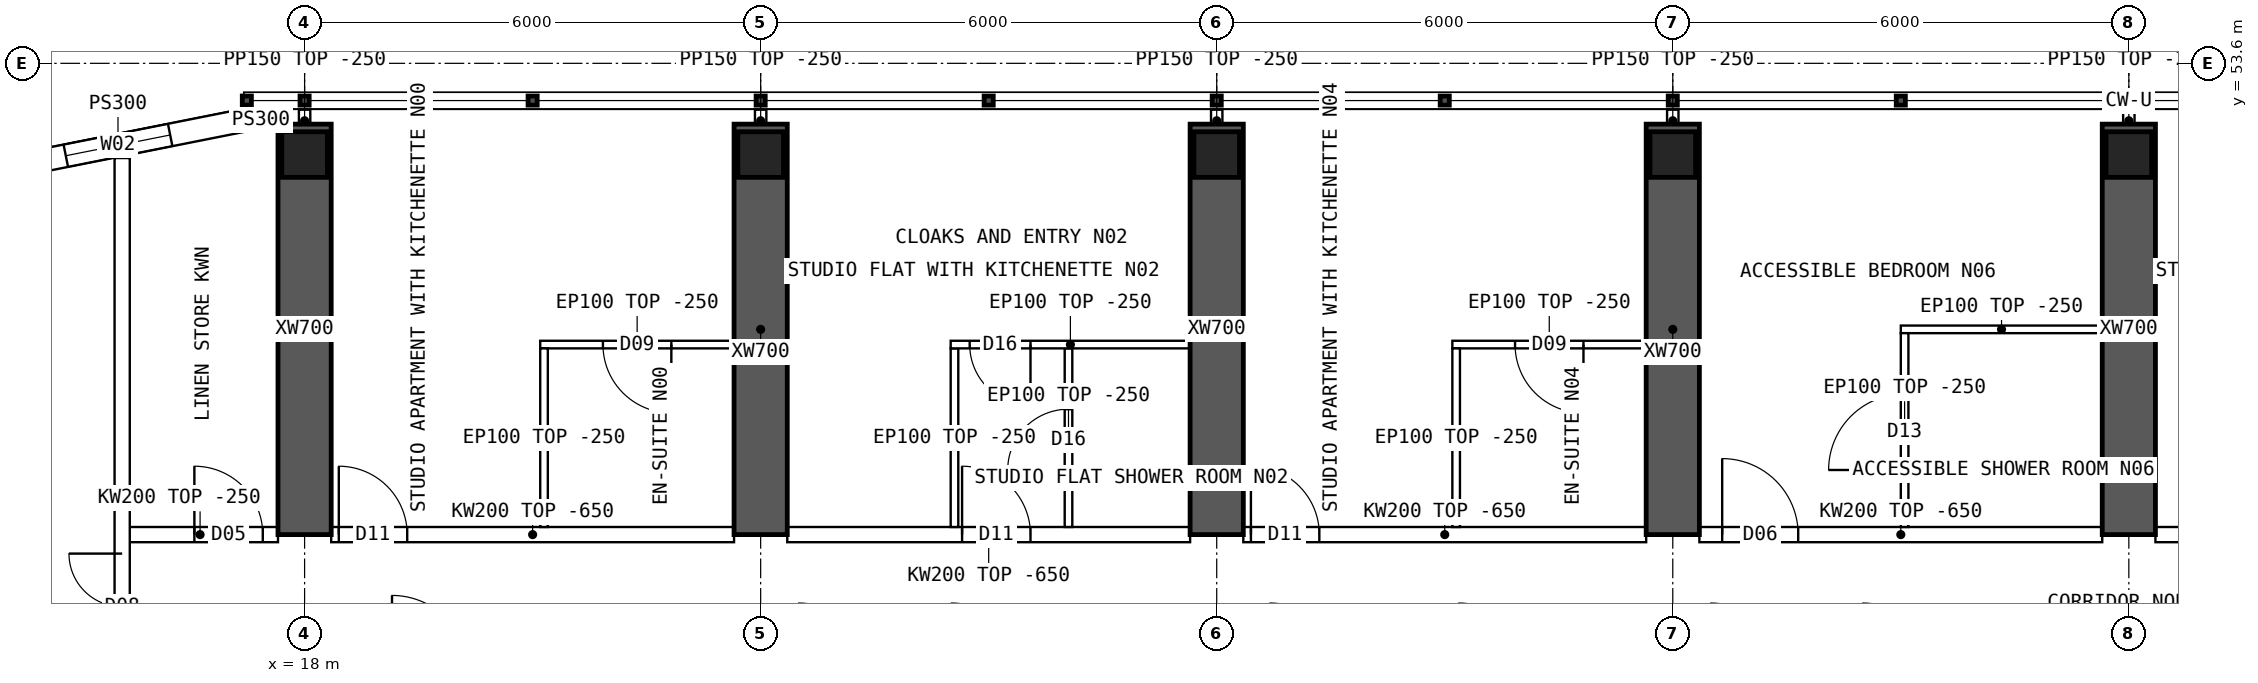
"""IFC4 building model, lengths in metres.
Left out: names, types, materials, properties, quantities, classifications, styles, units other than length and angle.
Written with IfcOpenShell. Run it as: python <this file> out.ifc"""

import sys

from ifc_helpers import new_model, si_unit, direction, frame, frame_2d, origin, origin_2d, place, context, subcontext, project, spatial, polyline, rectangle, hollow_rectangle, outline, extrude, element, fill, save


model = new_model("IFC4")
c1 = context("Model", 3, precision=1e-05, world=origin(), true_north=direction((0.0, 1.0)))
c2 = subcontext(c1, "Body", "Model", "MODEL_VIEW")
j1 = project(units=[si_unit("LENGTHUNIT", "METRE"), si_unit("PLANEANGLEUNIT", "RADIAN")], contexts=[c1])
p1 = place(None, origin())
s1 = spatial("IfcSite", under=j1, at=p1, CompositionType="ELEMENT")
p2 = place(p1, origin())
s2 = spatial("IfcBuilding", under=s1, at=p2, CompositionType="ELEMENT")
p3 = place(p2, frame((0.0, 0.0, 216.55)))
s3 = spatial("IfcBuildingStorey", under=s2, at=p3, CompositionType="ELEMENT", Elevation=216.55)
for number, where, z_axis, x_axis in (
    (1, (18.0, 52.4, 0.0), (0.0, 0.0, 1.0), (1.0, 0.0, 0.0)),
    (2, (24.0, 52.4, 0.0), (0.0, 0.0, 1.0), (1.0, 0.0, 0.0)),
    (3, (30.0, 52.4, 0.0), (0.0, 0.0, 1.0), (1.0, 0.0, 0.0)),
    (4, (36.0, 52.4, 0.0), (0.0, 0.0, 1.0), (1.0, 0.0, 0.0)),
    (5, (42.0, 52.4, 0.0), (0.0, 0.0, 1.0), (1.0, 0.0, 0.0)),
):
    element("IfcColumn", number, at=place(p3, frame(where, z_axis=z_axis, x_axis=x_axis)), inside=s3, PredefinedType="COLUMN", context=c2, shape_type="SweptSolid", body=[
        extrude(hollow_rectangle(XDim=0.6, YDim=0.6, WallThickness=0.06, at=origin_2d()), origin(), (0.0, 0.0, 1.0), 3.75),
    ])
for number, where, z_axis, x_axis in (
    (6, (18.0, 47.4, 0.0), (0.0, 0.0, 1.0), (0.0, 1.0, 0.0)),
    (7, (24.0, 47.4, 0.0), (0.0, 0.0, 1.0), (0.0, 1.0, 0.0)),
    (8, (30.0, 47.4, 0.0), (0.0, 0.0, 1.0), (0.0, 1.0, 0.0)),
    (9, (36.0, 47.4, 0.0), (0.0, 0.0, 1.0), (0.0, 1.0, 0.0)),
    (10, (42.0, 47.4, 0.0), (0.0, 0.0, 1.0), (0.0, 1.0, 0.0)),
):
    element("IfcWall", number, at=place(p3, frame(where, z_axis=z_axis, x_axis=x_axis)), inside=s3, PredefinedType="SHEAR", context=c2, shape_type="SweptSolid", body=[
        extrude(rectangle(XDim=5.4, YDim=0.7, at=frame_2d((2.7, 0.0))), origin(), (0.0, 0.0, 1.0), 3.75),
    ])
p4 = place(p3, frame((17.2, 52.85, 0.0), z_axis=(0.0, 0.0, 1.0), x_axis=(-0.98078325777, -0.195100490205, 0.0)))
e11 = element("IfcWall", 11, at=p4, inside=s3, PredefinedType="SOLIDWALL", context=c2, shape_type="SweptSolid", body=[
    extrude(outline(polyline([(-0.03, -0.15), (3.405, -0.15), (3.345, 0.15), (0.03, 0.15), (-0.03, -0.15)])), origin(), (0.0, 0.0, 1.0), 3.5),
])
p5 = place(p4, frame((0.988, 0.0, 0.9)))
e12 = element("IfcOpeningElement", 12, at=p5, cuts=e11, PredefinedType="OPENING", context=c2, shape_type="SweptSolid", body=[
    extrude(rectangle(XDim=1.4, YDim=1.8, at=frame_2d((0.7, 0.9))), frame((0.0, 0.16, 0.0), z_axis=(0.0, -1.0, 0.0), x_axis=(1.0, 0.0, 0.0)), (0.0, 0.0, 1.0), 0.32),
])
p6 = place(p3, frame((17.2, 52.85, 0.0), z_axis=(0.0, 0.0, 1.0), x_axis=(1.0, 0.0, 0.0)))
e13 = element("IfcWall", 13, at=p6, inside=s3, PredefinedType="SOLIDWALL", context=c2, shape_type="SweptSolid", body=[
    extrude(rectangle(XDim=0.45, YDim=0.3, at=frame_2d((0.225, 0.0))), origin(), (0.0, 0.0, 1.0), 3.5),
])
p7 = place(p3, frame((15.6, 47.4, 0.0), z_axis=(0.0, 0.0, 1.0), x_axis=(1.0, 0.0, 0.0)))
e14 = element("IfcWall", 14, at=p7, inside=s3, PredefinedType="SOLIDWALL", context=c2, shape_type="SweptSolid", body=[
    extrude(rectangle(XDim=2.05, YDim=0.2, at=frame_2d((1.025, 0.0))), origin(), (0.0, 0.0, 1.0), 3.5),
])
p8 = place(p7, frame((0.95, 0.0, 0.0)))
e15 = element("IfcOpeningElement", 15, at=p8, cuts=e14, PredefinedType="OPENING", context=c2, shape_type="SweptSolid", body=[
    extrude(rectangle(XDim=0.9, YDim=2.1, at=frame_2d((0.45, 1.05))), frame((0.0, 0.11, 0.0), z_axis=(0.0, -1.0, 0.0), x_axis=(1.0, 0.0, 0.0)), (0.0, 0.0, 1.0), 0.22),
])
p9 = place(p3, frame((18.35, 47.4, 0.0), z_axis=(0.0, 0.0, 1.0), x_axis=(1.0, 0.0, 0.0)))
e16 = element("IfcWall", 16, at=p9, inside=s3, PredefinedType="SOLIDWALL", context=c2, shape_type="SweptSolid", body=[
    extrude(outline(polyline([(0.0, 0.0), (5.3, 0.0), (5.3, 3.1), (0.0, 3.1), (0.0, 0.0)])), frame((0.0, 0.1, 0.0), z_axis=(0.0, -1.0, 0.0), x_axis=(1.0, 0.0, 0.0)), (0.0, 0.0, 1.0), 0.2),
])
p10 = place(p9, frame((0.1, 0.0, 0.0)))
e17 = element("IfcOpeningElement", 17, at=p10, cuts=e16, PredefinedType="OPENING", context=c2, shape_type="SweptSolid", body=[
    extrude(rectangle(XDim=0.9, YDim=2.1, at=frame_2d((0.45, 1.05))), frame((0.0, 0.11, 0.0), z_axis=(0.0, -1.0, 0.0), x_axis=(1.0, 0.0, 0.0)), (0.0, 0.0, 1.0), 0.22),
])
p11 = place(p3, frame((24.35, 47.4, 0.0), z_axis=(0.0, 0.0, 1.0), x_axis=(1.0, 0.0, 0.0)))
e18 = element("IfcWall", 18, at=p11, inside=s3, PredefinedType="SOLIDWALL", context=c2, shape_type="SweptSolid", body=[
    extrude(outline(polyline([(0.0, 0.0), (5.3, 0.0), (5.3, 3.1), (0.0, 3.1), (0.0, 0.0)])), frame((0.0, 0.1, 0.0), z_axis=(0.0, -1.0, 0.0), x_axis=(1.0, 0.0, 0.0)), (0.0, 0.0, 1.0), 0.2),
])
p12 = place(p11, frame((2.3, 0.0, 0.0)))
e19 = element("IfcOpeningElement", 19, at=p12, cuts=e18, PredefinedType="OPENING", context=c2, shape_type="SweptSolid", body=[
    extrude(rectangle(XDim=0.9, YDim=2.1, at=frame_2d((0.45, 1.05))), frame((0.0, 0.11, 0.0), z_axis=(0.0, -1.0, 0.0), x_axis=(1.0, 0.0, 0.0)), (0.0, 0.0, 1.0), 0.22),
])
p13 = place(p3, frame((30.35, 47.4, 0.0), z_axis=(0.0, 0.0, 1.0), x_axis=(1.0, 0.0, 0.0)))
e20 = element("IfcWall", 20, at=p13, inside=s3, PredefinedType="SOLIDWALL", context=c2, shape_type="SweptSolid", body=[
    extrude(outline(polyline([(0.0, 0.0), (5.3, 0.0), (5.3, 3.1), (0.0, 3.1), (0.0, 0.0)])), frame((0.0, 0.1, 0.0), z_axis=(0.0, -1.0, 0.0), x_axis=(1.0, 0.0, 0.0)), (0.0, 0.0, 1.0), 0.2),
])
p14 = place(p13, frame((0.1, 0.0, 0.0)))
e21 = element("IfcOpeningElement", 21, at=p14, cuts=e20, PredefinedType="OPENING", context=c2, shape_type="SweptSolid", body=[
    extrude(rectangle(XDim=0.9, YDim=2.1, at=frame_2d((0.45, 1.05))), frame((0.0, 0.11, 0.0), z_axis=(0.0, -1.0, 0.0), x_axis=(1.0, 0.0, 0.0)), (0.0, 0.0, 1.0), 0.22),
])
p15 = place(p3, frame((36.35, 47.4, 0.0), z_axis=(0.0, 0.0, 1.0), x_axis=(1.0, 0.0, 0.0)))
e22 = element("IfcWall", 22, at=p15, inside=s3, PredefinedType="SOLIDWALL", context=c2, shape_type="SweptSolid", body=[
    extrude(outline(polyline([(0.0, 0.0), (5.3, 0.0), (5.3, 3.1), (0.0, 3.1), (0.0, 0.0)])), frame((0.0, 0.1, 0.0), z_axis=(0.0, -1.0, 0.0), x_axis=(1.0, 0.0, 0.0)), (0.0, 0.0, 1.0), 0.2),
])
p16 = place(p15, frame((0.3, 0.0, 0.0)))
e23 = element("IfcOpeningElement", 23, at=p16, cuts=e22, PredefinedType="OPENING", context=c2, shape_type="SweptSolid", body=[
    extrude(rectangle(XDim=1.0, YDim=2.1, at=frame_2d((0.5, 1.05))), frame((0.0, 0.11, 0.0), z_axis=(0.0, -1.0, 0.0), x_axis=(1.0, 0.0, 0.0)), (0.0, 0.0, 1.0), 0.22),
])
p17 = place(p3, frame((42.35, 47.4, 0.0), z_axis=(0.0, 0.0, 1.0), x_axis=(1.0, 0.0, 0.0)))
e24 = element("IfcWall", 24, at=p17, inside=s3, PredefinedType="SOLIDWALL", context=c2, shape_type="SweptSolid", body=[
    extrude(outline(polyline([(0.0, 0.0), (5.3, 0.0), (5.3, 3.1), (0.0, 3.1), (0.0, 0.0)])), frame((0.0, 0.1, 0.0), z_axis=(0.0, -1.0, 0.0), x_axis=(1.0, 0.0, 0.0)), (0.0, 0.0, 1.0), 0.2),
])
p18 = place(p17, frame((2.3, 0.0, 0.0)))
e25 = element("IfcOpeningElement", 25, at=p18, cuts=e24, PredefinedType="OPENING", context=c2, shape_type="SweptSolid", body=[
    extrude(rectangle(XDim=0.9, YDim=2.1, at=frame_2d((0.45, 1.05))), frame((0.0, 0.11, 0.0), z_axis=(0.0, -1.0, 0.0), x_axis=(1.0, 0.0, 0.0)), (0.0, 0.0, 1.0), 0.22),
])
p19 = place(p3, frame((21.1, 49.9, 0.0), z_axis=(0.0, 0.0, 1.0), x_axis=(1.0, 0.0, 0.0)))
e26 = element("IfcWall", 26, at=p19, inside=s3, PredefinedType="PARTITIONING", context=c2, shape_type="SweptSolid", body=[
    extrude(rectangle(XDim=2.55, YDim=0.1, at=frame_2d((1.275, 0.0))), origin(), (0.0, 0.0, 1.0), 3.5),
])
p20 = place(p19, frame((0.825, 0.0, 0.0)))
e27 = element("IfcOpeningElement", 27, at=p20, cuts=e26, PredefinedType="OPENING", context=c2, shape_type="SweptSolid", body=[
    extrude(rectangle(XDim=0.9, YDim=2.1, at=frame_2d((0.45, 1.05))), frame((0.0, 0.06, 0.0), z_axis=(0.0, -1.0, 0.0), x_axis=(1.0, 0.0, 0.0)), (0.0, 0.0, 1.0), 0.12),
])
p21 = place(p3, frame((21.15, 49.85, 0.0), z_axis=(0.0, 0.0, 1.0), x_axis=(0.0, -1.0, 0.0)))
e28 = element("IfcWall", 28, at=p21, inside=s3, PredefinedType="PARTITIONING", context=c2, shape_type="SweptSolid", body=[
    extrude(outline(polyline([(0.0, 0.0), (2.35, 0.0), (2.35, 3.1), (2.302, 3.1), (2.3, 3.5), (0.0, 3.5), (0.0, 0.0)])), frame((0.0, 0.05, 0.0), z_axis=(0.0, -1.0, 0.0), x_axis=(1.0, 0.0, 0.0)), (0.0, 0.0, 1.0), 0.1),
])
p22 = place(p3, frame((26.5, 49.9, 0.0), z_axis=(0.0, 0.0, 1.0), x_axis=(1.0, 0.0, 0.0)))
e29 = element("IfcWall", 29, at=p22, inside=s3, PredefinedType="PARTITIONING", context=c2, shape_type="SweptSolid", body=[
    extrude(rectangle(XDim=3.15, YDim=0.1, at=frame_2d((1.575, 0.0))), origin(), (0.0, 0.0, 1.0), 3.5),
])
p23 = place(p22, frame((0.25, 0.0, 0.0)))
e30 = element("IfcOpeningElement", 30, at=p23, cuts=e29, PredefinedType="OPENING", context=c2, shape_type="SweptSolid", body=[
    extrude(rectangle(XDim=0.8, YDim=2.1, at=frame_2d((0.4, 1.05))), frame((0.0, 0.06, 0.0), z_axis=(0.0, -1.0, 0.0), x_axis=(1.0, 0.0, 0.0)), (0.0, 0.0, 1.0), 0.12),
])
p24 = place(p3, frame((26.55, 49.85, 0.0), z_axis=(0.0, 0.0, 1.0), x_axis=(0.0, -1.0, 0.0)))
e31 = element("IfcWall", 31, at=p24, inside=s3, PredefinedType="PARTITIONING", context=c2, shape_type="SweptSolid", body=[
    extrude(outline(polyline([(0.0, 0.0), (2.35, 0.0), (2.35, 3.1), (2.302, 3.1), (2.3, 3.5), (0.0, 3.5), (0.0, 0.0)])), frame((0.0, 0.05, 0.0), z_axis=(0.0, -1.0, 0.0), x_axis=(1.0, 0.0, 0.0)), (0.0, 0.0, 1.0), 0.1),
])
p25 = place(p3, frame((28.05, 49.85, 0.0), z_axis=(0.0, 0.0, 1.0), x_axis=(0.0, -1.0, 0.0)))
e32 = element("IfcWall", 32, at=p25, inside=s3, PredefinedType="PARTITIONING", context=c2, shape_type="SweptSolid", body=[
    extrude(outline(polyline([(0.0, 0.0), (2.35, 0.0), (2.35, 3.1), (2.302, 3.1), (2.3, 3.5), (0.0, 3.5), (0.0, 0.0)])), frame((0.0, 0.05, 0.0), z_axis=(0.0, -1.0, 0.0), x_axis=(1.0, 0.0, 0.0)), (0.0, 0.0, 1.0), 0.1),
])
p26 = place(p25, frame((0.8, 0.0, 0.0)))
e33 = element("IfcOpeningElement", 33, at=p26, cuts=e32, PredefinedType="OPENING", context=c2, shape_type="SweptSolid", body=[
    extrude(rectangle(XDim=0.8, YDim=2.1, at=frame_2d((0.4, 1.05))), frame((0.0, 0.06, 0.0), z_axis=(0.0, -1.0, 0.0), x_axis=(1.0, 0.0, 0.0)), (0.0, 0.0, 1.0), 0.12),
])
p27 = place(p3, frame((33.1, 49.9, 0.0), z_axis=(0.0, 0.0, 1.0), x_axis=(1.0, 0.0, 0.0)))
e34 = element("IfcWall", 34, at=p27, inside=s3, PredefinedType="PARTITIONING", context=c2, shape_type="SweptSolid", body=[
    extrude(rectangle(XDim=2.55, YDim=0.1, at=frame_2d((1.275, 0.0))), origin(), (0.0, 0.0, 1.0), 3.5),
])
p28 = place(p27, frame((0.825, 0.0, 0.0)))
e35 = element("IfcOpeningElement", 35, at=p28, cuts=e34, PredefinedType="OPENING", context=c2, shape_type="SweptSolid", body=[
    extrude(rectangle(XDim=0.9, YDim=2.1, at=frame_2d((0.45, 1.05))), frame((0.0, 0.06, 0.0), z_axis=(0.0, -1.0, 0.0), x_axis=(1.0, 0.0, 0.0)), (0.0, 0.0, 1.0), 0.12),
])
p29 = place(p3, frame((33.15, 49.85, 0.0), z_axis=(0.0, 0.0, 1.0), x_axis=(0.0, -1.0, 0.0)))
e36 = element("IfcWall", 36, at=p29, inside=s3, PredefinedType="PARTITIONING", context=c2, shape_type="SweptSolid", body=[
    extrude(outline(polyline([(0.0, 0.0), (2.35, 0.0), (2.35, 3.1), (2.302, 3.1), (2.3, 3.5), (0.0, 3.5), (0.0, 0.0)])), frame((0.0, 0.05, 0.0), z_axis=(0.0, -1.0, 0.0), x_axis=(1.0, 0.0, 0.0)), (0.0, 0.0, 1.0), 0.1),
])
p30 = place(p3, frame((39.0, 50.1, 0.0), z_axis=(0.0, 0.0, 1.0), x_axis=(1.0, 0.0, 0.0)))
e37 = element("IfcWall", 37, at=p30, inside=s3, PredefinedType="PARTITIONING", context=c2, shape_type="SweptSolid", body=[
    extrude(rectangle(XDim=2.65, YDim=0.1, at=frame_2d((1.325, 0.0))), origin(), (0.0, 0.0, 1.0), 3.5),
])
p31 = place(p3, frame((39.05, 50.05, 0.0), z_axis=(0.0, 0.0, 1.0), x_axis=(0.0, -1.0, 0.0)))
e38 = element("IfcWall", 38, at=p31, inside=s3, PredefinedType="PARTITIONING", context=c2, shape_type="SweptSolid", body=[
    extrude(outline(polyline([(0.0, 0.0), (2.55, 0.0), (2.55, 3.1), (2.502, 3.1), (2.5, 3.5), (0.0, 3.5), (0.0, 0.0)])), frame((0.0, 0.05, 0.0), z_axis=(0.0, -1.0, 0.0), x_axis=(1.0, 0.0, 0.0)), (0.0, 0.0, 1.0), 0.1),
])
p32 = place(p31, frame((0.8, 0.0, 0.0)))
e39 = element("IfcOpeningElement", 39, at=p32, cuts=e38, PredefinedType="OPENING", context=c2, shape_type="SweptSolid", body=[
    extrude(rectangle(XDim=1.0, YDim=2.1, at=frame_2d((0.5, 1.05))), frame((0.0, 0.06, 0.0), z_axis=(0.0, -1.0, 0.0), x_axis=(1.0, 0.0, 0.0)), (0.0, 0.0, 1.0), 0.12),
])
p33 = place(p3, frame((15.6, 11.646, 0.0), z_axis=(0.0, 0.0, 1.0), x_axis=(0.0, 1.0, 0.0)))
e40 = element("IfcWall", 40, at=p33, inside=s3, PredefinedType="SOLIDWALL", context=c2, shape_type="SweptSolid", body=[
    extrude(rectangle(XDim=40.708, YDim=0.2, at=frame_2d((20.354, 0.0))), origin(), (0.0, 0.0, 1.0), 3.5),
])
p34 = place(p33, frame((13.434, 0.0, 0.0)))
e41 = element("IfcOpeningElement", 41, at=p34, cuts=e40, PredefinedType="OPENING", context=c2, shape_type="SweptSolid", body=[
    extrude(rectangle(XDim=1.2, YDim=2.1, at=frame_2d((0.6, 1.05))), frame((0.0, 0.11, 0.0), z_axis=(0.0, -1.0, 0.0), x_axis=(1.0, 0.0, 0.0)), (0.0, 0.0, 1.0), 0.22),
])
p35 = place(p33, frame((5.104, 0.0, 0.0)))
e42 = element("IfcOpeningElement", 42, at=p35, cuts=e40, PredefinedType="OPENING", context=c2, shape_type="SweptSolid", body=[
    extrude(rectangle(XDim=1.4, YDim=2.1, at=frame_2d((0.7, 1.05))), frame((0.0, 0.11, 0.0), z_axis=(0.0, -1.0, 0.0), x_axis=(1.0, 0.0, 0.0)), (0.0, 0.0, 1.0), 0.22),
])
p36 = place(p33, frame((34.104, 0.0, 0.0)))
e43 = element("IfcOpeningElement", 43, at=p36, cuts=e40, PredefinedType="OPENING", context=c2, shape_type="SweptSolid", body=[
    extrude(rectangle(XDim=1.4, YDim=2.1, at=frame_2d((0.7, 1.05))), frame((0.0, 0.11, 0.0), z_axis=(0.0, -1.0, 0.0), x_axis=(1.0, 0.0, 0.0)), (0.0, 0.0, 1.0), 0.22),
])
for number, where, z_axis, x_axis in (
    (44, (18.0, 52.7, 0.0), (0.0, 0.0, 1.0), (0.0, 1.0, 0.0)),
    (45, (24.0, 52.7, 0.0), (0.0, 0.0, 1.0), (0.0, 1.0, 0.0)),
    (46, (30.0, 52.7, 0.0), (0.0, 0.0, 1.0), (0.0, 1.0, 0.0)),
    (47, (36.0, 52.7, 0.0), (0.0, 0.0, 1.0), (0.0, 1.0, 0.0)),
    (48, (42.0, 52.7, 0.0), (0.0, 0.0, 1.0), (0.0, 1.0, 0.0)),
):
    element("IfcWall", number, at=place(p3, frame(where, z_axis=z_axis, x_axis=x_axis)), inside=s3, PredefinedType="PARTITIONING", context=c2, shape_type="SweptSolid", body=[
        extrude(rectangle(XDim=0.29, YDim=0.15, at=frame_2d((0.145, 0.0))), origin(), (0.0, 0.0, 1.0), 3.5),
    ])
p37 = place(p5, origin())
e49 = element("IfcWindow", 49, at=p37, inside=s3, PartitioningType="SINGLE_PANEL", PredefinedType="WINDOW", context=c2, shape_type="SweptSolid", body=[
    extrude(rectangle(XDim=1.4, YDim=1.8, at=frame_2d((0.7, 0.9))), frame((0.0, 0.03, 0.0), z_axis=(0.0, -1.0, 0.0), x_axis=(1.0, 0.0, 0.0)), (0.0, 0.0, 1.0), 0.06),
])
fill(e12, e49)
p38 = place(p20, origin())
e50 = element("IfcDoor", 50, at=p38, inside=s3, OperationType="SINGLE_SWING_RIGHT", PredefinedType="DOOR", context=c2, shape_type="SweptSolid", body=[
    extrude(rectangle(XDim=0.9, YDim=2.1, at=frame_2d((0.45, 1.05))), frame((0.0, 0.025, 0.0), z_axis=(0.0, -1.0, 0.0), x_axis=(1.0, 0.0, 0.0)), (0.0, 0.0, 1.0), 0.05),
])
fill(e27, e50)
p39 = place(p10, origin())
e51 = element("IfcDoor", 51, at=p39, inside=s3, OperationType="SINGLE_SWING_LEFT", PredefinedType="DOOR", context=c2, shape_type="SweptSolid", body=[
    extrude(rectangle(XDim=0.9, YDim=2.1, at=frame_2d((0.45, 1.05))), frame((0.0, 0.025, 0.0), z_axis=(0.0, -1.0, 0.0), x_axis=(1.0, 0.0, 0.0)), (0.0, 0.0, 1.0), 0.05),
])
fill(e17, e51)
p40 = place(p23, origin())
e52 = element("IfcDoor", 52, at=p40, inside=s3, OperationType="SINGLE_SWING_RIGHT", PredefinedType="DOOR", context=c2, shape_type="SweptSolid", body=[
    extrude(rectangle(XDim=0.8, YDim=2.1, at=frame_2d((0.4, 1.05))), frame((0.0, 0.025, 0.0), z_axis=(0.0, -1.0, 0.0), x_axis=(1.0, 0.0, 0.0)), (0.0, 0.0, 1.0), 0.05),
])
fill(e30, e52)
p41 = place(p26, origin())
e53 = element("IfcDoor", 53, at=p41, inside=s3, OperationType="SINGLE_SWING_RIGHT", PredefinedType="DOOR", context=c2, shape_type="SweptSolid", body=[
    extrude(rectangle(XDim=0.8, YDim=2.1, at=frame_2d((0.4, 1.05))), frame((0.0, 0.025, 0.0), z_axis=(0.0, -1.0, 0.0), x_axis=(1.0, 0.0, 0.0)), (0.0, 0.0, 1.0), 0.05),
])
fill(e33, e53)
p42 = place(p12, origin())
e54 = element("IfcDoor", 54, at=p42, inside=s3, OperationType="SINGLE_SWING_LEFT", PredefinedType="DOOR", context=c2, shape_type="SweptSolid", body=[
    extrude(rectangle(XDim=0.9, YDim=2.1, at=frame_2d((0.45, 1.05))), frame((0.0, 0.025, 0.0), z_axis=(0.0, -1.0, 0.0), x_axis=(1.0, 0.0, 0.0)), (0.0, 0.0, 1.0), 0.05),
])
fill(e19, e54)
p43 = place(p28, origin())
e55 = element("IfcDoor", 55, at=p43, inside=s3, OperationType="SINGLE_SWING_RIGHT", PredefinedType="DOOR", context=c2, shape_type="SweptSolid", body=[
    extrude(rectangle(XDim=0.9, YDim=2.1, at=frame_2d((0.45, 1.05))), frame((0.0, 0.025, 0.0), z_axis=(0.0, -1.0, 0.0), x_axis=(1.0, 0.0, 0.0)), (0.0, 0.0, 1.0), 0.05),
])
fill(e35, e55)
p44 = place(p14, origin())
e56 = element("IfcDoor", 56, at=p44, inside=s3, OperationType="SINGLE_SWING_LEFT", PredefinedType="DOOR", context=c2, shape_type="SweptSolid", body=[
    extrude(rectangle(XDim=0.9, YDim=2.1, at=frame_2d((0.45, 1.05))), frame((0.0, 0.025, 0.0), z_axis=(0.0, -1.0, 0.0), x_axis=(1.0, 0.0, 0.0)), (0.0, 0.0, 1.0), 0.05),
])
fill(e21, e56)
p45 = place(p32, origin())
e57 = element("IfcDoor", 57, at=p45, inside=s3, OperationType="SINGLE_SWING_RIGHT", PredefinedType="DOOR", context=c2, shape_type="SweptSolid", body=[
    extrude(rectangle(XDim=1.0, YDim=2.1, at=frame_2d((0.5, 1.05))), frame((0.0, 0.025, 0.0), z_axis=(0.0, -1.0, 0.0), x_axis=(1.0, 0.0, 0.0)), (0.0, 0.0, 1.0), 0.05),
])
fill(e39, e57)
p46 = place(p16, origin())
e58 = element("IfcDoor", 58, at=p46, inside=s3, OperationType="SINGLE_SWING_LEFT", PredefinedType="DOOR", context=c2, shape_type="SweptSolid", body=[
    extrude(rectangle(XDim=1.0, YDim=2.1, at=frame_2d((0.5, 1.05))), frame((0.0, 0.025, 0.0), z_axis=(0.0, -1.0, 0.0), x_axis=(1.0, 0.0, 0.0)), (0.0, 0.0, 1.0), 0.05),
])
fill(e23, e58)
p47 = place(p36, origin())
e59 = element("IfcDoor", 59, at=p47, inside=s3, OperationType="DOUBLE_DOOR_SINGLE_SWING", PredefinedType="DOOR", context=c2, shape_type="SweptSolid", body=[
    extrude(rectangle(XDim=1.4, YDim=2.1, at=frame_2d((0.7, 1.05))), frame((0.0, 0.025, 0.0), z_axis=(0.0, -1.0, 0.0), x_axis=(1.0, 0.0, 0.0)), (0.0, 0.0, 1.0), 0.05),
])
fill(e43, e59)
p48 = place(p8, origin())
e60 = element("IfcDoor", 60, at=p48, inside=s3, OperationType="SINGLE_SWING_LEFT", PredefinedType="DOOR", context=c2, shape_type="SweptSolid", body=[
    extrude(rectangle(XDim=0.9, YDim=2.1, at=frame_2d((0.45, 1.05))), frame((0.0, 0.025, 0.0), z_axis=(0.0, -1.0, 0.0), x_axis=(1.0, 0.0, 0.0)), (0.0, 0.0, 1.0), 0.05),
])
fill(e15, e60)
save(model, sys.argv[1])
